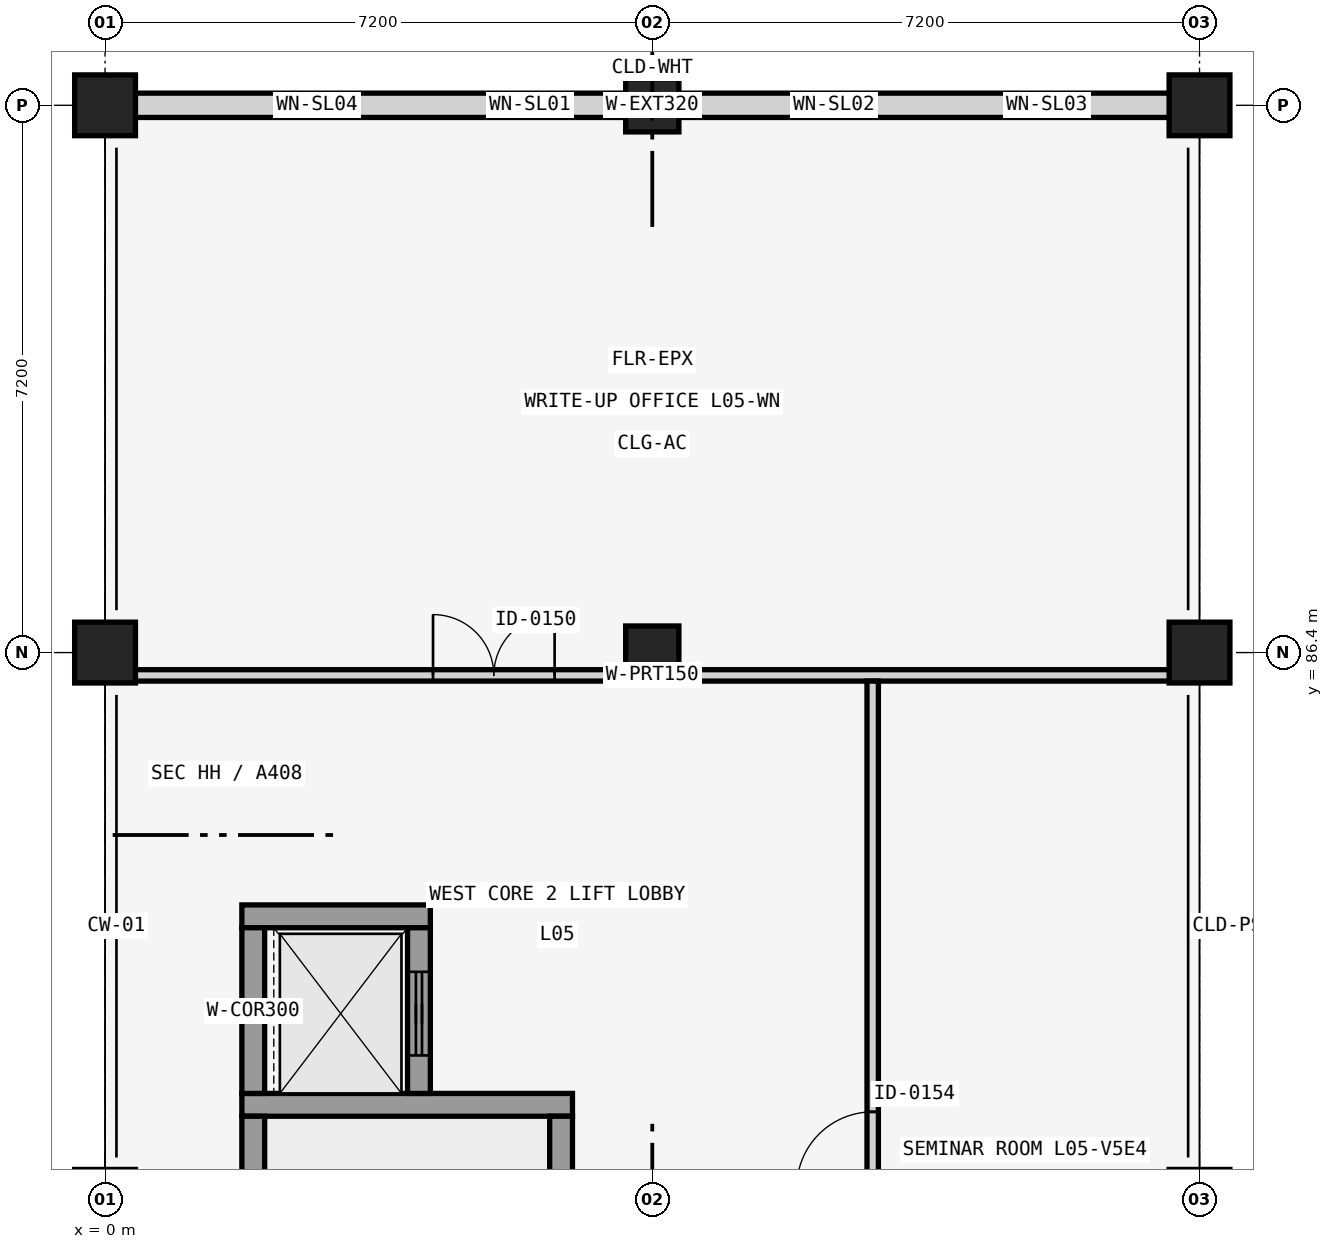
"""IFC4 building model, lengths in metres.
Left out: names, types, materials, properties, quantities, classifications, styles, units other than length and angle.
Written with IfcOpenShell. Run it as: python <this file> out.ifc"""

import sys

from ifc_helpers import new_model, si_unit, direction, frame, frame_2d, origin, origin_2d, place, context, subcontext, project, spatial, rectangle, extrude, element, fill, save


model = new_model("IFC4")
c1 = context("Model", 3, precision=1e-05, world=origin(), true_north=direction((0.0, 1.0)))
c2 = subcontext(c1, "Body", "Model", "MODEL_VIEW")
j1 = project(units=[si_unit("LENGTHUNIT", "METRE"), si_unit("PLANEANGLEUNIT", "RADIAN")], contexts=[c1])
p1 = place(None, origin())
s1 = spatial("IfcSite", under=j1, at=p1, CompositionType="ELEMENT")
p2 = place(p1, origin())
s2 = spatial("IfcBuilding", under=s1, at=p2, CompositionType="ELEMENT")
p3 = place(p2, frame((0.0, 0.0, 21.44)))
s3 = spatial("IfcBuildingStorey", under=s2, at=p3, CompositionType="ELEMENT", Elevation=21.44)
for number, where, z_axis, x_axis in (
    (1, (0.0, 86.4, 0.0), (0.0, 0.0, 1.0), (1.0, 0.0, 0.0)),
    (2, (0.0, 93.6, 0.0), (0.0, 0.0, 1.0), (1.0, 0.0, 0.0)),
):
    element("IfcColumn", number, at=place(p3, frame(where, z_axis=z_axis, x_axis=x_axis)), inside=s3, PredefinedType="COLUMN", context=c2, shape_type="SweptSolid", body=[
        extrude(rectangle(XDim=0.8, YDim=0.8, at=origin_2d()), origin(), (0.0, 0.0, 1.0), 4.16),
    ])
for number, where, z_axis, x_axis in (
    (3, (7.2, 86.4, 0.0), (0.0, 0.0, 1.0), (1.0, 0.0, 0.0)),
    (4, (7.2, 93.6, 0.0), (0.0, 0.0, 1.0), (1.0, 0.0, 0.0)),
):
    element("IfcColumn", number, at=place(p3, frame(where, z_axis=z_axis, x_axis=x_axis)), inside=s3, PredefinedType="COLUMN", context=c2, shape_type="SweptSolid", body=[
        extrude(rectangle(XDim=0.7, YDim=0.7, at=origin_2d()), origin(), (0.0, 0.0, 1.0), 4.16),
    ])
for number, where, z_axis, x_axis in (
    (5, (14.4, 86.4, 0.0), (0.0, 0.0, 1.0), (1.0, 0.0, 0.0)),
    (6, (14.4, 93.6, 0.0), (0.0, 0.0, 1.0), (1.0, 0.0, 0.0)),
):
    element("IfcColumn", number, at=place(p3, frame(where, z_axis=z_axis, x_axis=x_axis)), inside=s3, PredefinedType="COLUMN", context=c2, shape_type="SweptSolid", body=[
        extrude(rectangle(XDim=0.8, YDim=0.8, at=origin_2d()), origin(), (0.0, 0.0, 1.0), 4.16),
    ])
p4 = place(p3, frame((0.39, 93.6, 0.0), z_axis=(0.0, 0.0, 1.0), x_axis=(1.0, 0.0, 0.0)))
e7 = element("IfcWall", 7, at=p4, inside=s3, PredefinedType="SOLIDWALL", context=c2, shape_type="SweptSolid", body=[
    extrude(rectangle(XDim=13.62, YDim=0.32, at=frame_2d((6.81, 0.0))), origin(), (0.0, 0.0, 1.0), 3.42),
])
p5 = place(p4, frame((2.175, 0.0, 0.85)))
e8 = element("IfcOpeningElement", 8, at=p5, cuts=e7, PredefinedType="OPENING", context=c2, shape_type="SweptSolid", body=[
    extrude(rectangle(XDim=0.45, YDim=2.1, at=frame_2d((0.225, 1.05))), frame((0.0, 0.17, 0.0), z_axis=(0.0, -1.0, 0.0), x_axis=(1.0, 0.0, 0.0)), (0.0, 0.0, 1.0), 0.34),
])
p6 = place(p4, frame((4.975, 0.0, 0.85)))
e9 = element("IfcOpeningElement", 9, at=p6, cuts=e7, PredefinedType="OPENING", context=c2, shape_type="SweptSolid", body=[
    extrude(rectangle(XDim=0.45, YDim=2.4, at=frame_2d((0.225, 1.2))), frame((0.0, 0.17, 0.0), z_axis=(0.0, -1.0, 0.0), x_axis=(1.0, 0.0, 0.0)), (0.0, 0.0, 1.0), 0.34),
])
p7 = place(p4, frame((8.95, 0.0, 0.85)))
e10 = element("IfcOpeningElement", 10, at=p7, cuts=e7, PredefinedType="OPENING", context=c2, shape_type="SweptSolid", body=[
    extrude(rectangle(XDim=0.5, YDim=2.4, at=frame_2d((0.25, 1.2))), frame((0.0, 0.17, 0.0), z_axis=(0.0, -1.0, 0.0), x_axis=(1.0, 0.0, 0.0)), (0.0, 0.0, 1.0), 0.34),
])
p8 = place(p4, frame((11.725, 0.0, 0.85)))
e11 = element("IfcOpeningElement", 11, at=p8, cuts=e7, PredefinedType="OPENING", context=c2, shape_type="SweptSolid", body=[
    extrude(rectangle(XDim=0.55, YDim=2.2, at=frame_2d((0.275, 1.1))), frame((0.0, 0.17, 0.0), z_axis=(0.0, -1.0, 0.0), x_axis=(1.0, 0.0, 0.0)), (0.0, 0.0, 1.0), 0.34),
])
p9 = place(p3, frame((1.8, 80.45, 0.0), z_axis=(0.0, 0.0, 1.0), x_axis=(1.0, 0.0, 0.0)))
e12 = element("IfcWall", 12, at=p9, inside=s3, PredefinedType="SHEAR", context=c2, shape_type="SweptSolid", body=[
    extrude(rectangle(XDim=4.35, YDim=0.3, at=frame_2d((2.175, 0.0))), origin(), (0.0, 0.0, 1.0), 3.81),
])
p10 = place(p3, frame((1.95, 72.5, 0.0), z_axis=(0.0, 0.0, 1.0), x_axis=(0.0, 1.0, 0.0)))
e13 = element("IfcWall", 13, at=p10, inside=s3, PredefinedType="SHEAR", context=c2, shape_type="SweptSolid", body=[
    extrude(rectangle(XDim=7.8, YDim=0.3, at=frame_2d((3.9, 0.0))), origin(), (0.0, 0.0, 1.0), 3.81),
])
p11 = place(p3, frame((6.0, 72.5, 0.0), z_axis=(0.0, 0.0, 1.0), x_axis=(0.0, 1.0, 0.0)))
e14 = element("IfcWall", 14, at=p11, inside=s3, PredefinedType="SHEAR", context=c2, shape_type="SweptSolid", body=[
    extrude(rectangle(XDim=7.8, YDim=0.3, at=frame_2d((3.9, 0.0))), origin(), (0.0, 0.0, 1.0), 3.81),
])
p12 = place(p11, frame((0.4, 0.0, 0.0)))
e15 = element("IfcOpeningElement", 15, at=p12, cuts=e14, PredefinedType="OPENING", context=c2, shape_type="SweptSolid", body=[
    extrude(rectangle(XDim=1.15, YDim=2.2, at=frame_2d((0.575, 1.1))), frame((0.0, 0.16, 0.0), z_axis=(0.0, -1.0, 0.0), x_axis=(1.0, 0.0, 0.0)), (0.0, 0.0, 1.0), 0.32),
])
p13 = place(p3, frame((1.8, 82.93, 0.0), z_axis=(0.0, 0.0, 1.0), x_axis=(1.0, 0.0, 0.0)))
e16 = element("IfcWall", 16, at=p13, inside=s3, PredefinedType="SHEAR", context=c2, shape_type="SweptSolid", body=[
    extrude(rectangle(XDim=2.48, YDim=0.3, at=frame_2d((1.24, 0.0))), origin(), (0.0, 0.0, 1.0), 3.81),
])
p14 = place(p3, frame((1.95, 80.6, 0.0), z_axis=(0.0, 0.0, 1.0), x_axis=(0.0, 1.0, 0.0)))
e17 = element("IfcWall", 17, at=p14, inside=s3, PredefinedType="SHEAR", context=c2, shape_type="SweptSolid", body=[
    extrude(rectangle(XDim=2.18, YDim=0.3, at=frame_2d((1.09, 0.0))), origin(), (0.0, 0.0, 1.0), 3.81),
])
p15 = place(p3, frame((4.13, 80.6, 0.0), z_axis=(0.0, 0.0, 1.0), x_axis=(0.0, 1.0, 0.0)))
e18 = element("IfcWall", 18, at=p15, inside=s3, PredefinedType="SHEAR", context=c2, shape_type="SweptSolid", body=[
    extrude(rectangle(XDim=2.18, YDim=0.3, at=frame_2d((1.09, 0.0))), origin(), (0.0, 0.0, 1.0), 3.81),
])
p16 = place(p15, frame((0.5, 0.0, 0.0)))
e19 = element("IfcOpeningElement", 19, at=p16, cuts=e18, PredefinedType="OPENING", context=c2, shape_type="SweptSolid", body=[
    extrude(rectangle(XDim=1.1, YDim=2.2, at=frame_2d((0.55, 1.1))), frame((0.0, 0.16, 0.0), z_axis=(0.0, -1.0, 0.0), x_axis=(1.0, 0.0, 0.0)), (0.0, 0.0, 1.0), 0.32),
])
p17 = place(p3, frame((0.25, 86.1, 0.0), z_axis=(0.0, 0.0, 1.0), x_axis=(1.0, 0.0, 0.0)))
e20 = element("IfcWall", 20, at=p17, inside=s3, PredefinedType="PARTITIONING", context=c2, shape_type="SweptSolid", body=[
    extrude(rectangle(XDim=13.9, YDim=0.15, at=frame_2d((6.95, 0.0))), origin(), (0.0, 0.0, 1.0), 3.21),
])
p18 = place(p17, frame((4.065, 0.0, 0.0)))
e21 = element("IfcOpeningElement", 21, at=p18, cuts=e20, PredefinedType="OPENING", context=c2, shape_type="SweptSolid", body=[
    extrude(rectangle(XDim=1.6, YDim=2.25, at=frame_2d((0.8, 1.125))), frame((0.0, 0.085, 0.0), z_axis=(0.0, -1.0, 0.0), x_axis=(1.0, 0.0, 0.0)), (0.0, 0.0, 1.0), 0.17),
])
p19 = place(p3, frame((10.1, 73.69, 0.0), z_axis=(0.0, 0.0, 1.0), x_axis=(0.0, 1.0, 0.0)))
e22 = element("IfcWall", 22, at=p19, inside=s3, PredefinedType="PARTITIONING", context=c2, shape_type="SweptSolid", body=[
    extrude(rectangle(XDim=12.335, YDim=0.15, at=frame_2d((6.167, 0.0))), origin(), (0.0, 0.0, 1.0), 3.81),
])
p20 = place(p19, frame((5.667, 0.0, 0.0)))
e23 = element("IfcOpeningElement", 23, at=p20, cuts=e22, PredefinedType="OPENING", context=c2, shape_type="SweptSolid", body=[
    extrude(rectangle(XDim=1.0, YDim=2.1, at=frame_2d((0.5, 1.05))), frame((0.0, 0.085, 0.0), z_axis=(0.0, -1.0, 0.0), x_axis=(1.0, 0.0, 0.0)), (0.0, 0.0, 1.0), 0.17),
])
p21 = place(p5, origin())
e24 = element("IfcWindow", 24, at=p21, inside=s3, PartitioningType="SINGLE_PANEL", PredefinedType="WINDOW", context=c2, shape_type="SweptSolid", body=[
    extrude(rectangle(XDim=0.45, YDim=2.1, at=frame_2d((0.225, 1.05))), frame((0.0, 0.03, 0.0), z_axis=(0.0, -1.0, 0.0), x_axis=(1.0, 0.0, 0.0)), (0.0, 0.0, 1.0), 0.06),
])
fill(e8, e24)
p22 = place(p6, origin())
e25 = element("IfcWindow", 25, at=p22, inside=s3, PartitioningType="SINGLE_PANEL", PredefinedType="WINDOW", context=c2, shape_type="SweptSolid", body=[
    extrude(rectangle(XDim=0.45, YDim=2.4, at=frame_2d((0.225, 1.2))), frame((0.0, 0.03, 0.0), z_axis=(0.0, -1.0, 0.0), x_axis=(1.0, 0.0, 0.0)), (0.0, 0.0, 1.0), 0.06),
])
fill(e9, e25)
p23 = place(p7, origin())
e26 = element("IfcWindow", 26, at=p23, inside=s3, PartitioningType="SINGLE_PANEL", PredefinedType="WINDOW", context=c2, shape_type="SweptSolid", body=[
    extrude(rectangle(XDim=0.5, YDim=2.4, at=frame_2d((0.25, 1.2))), frame((0.0, 0.03, 0.0), z_axis=(0.0, -1.0, 0.0), x_axis=(1.0, 0.0, 0.0)), (0.0, 0.0, 1.0), 0.06),
])
fill(e10, e26)
p24 = place(p8, origin())
e27 = element("IfcWindow", 27, at=p24, inside=s3, PartitioningType="SINGLE_PANEL", PredefinedType="WINDOW", context=c2, shape_type="SweptSolid", body=[
    extrude(rectangle(XDim=0.55, YDim=2.2, at=frame_2d((0.275, 1.1))), frame((0.0, 0.03, 0.0), z_axis=(0.0, -1.0, 0.0), x_axis=(1.0, 0.0, 0.0)), (0.0, 0.0, 1.0), 0.06),
])
fill(e11, e27)
p25 = place(p16, origin())
e28 = element("IfcDoor", 28, at=p25, inside=s3, OperationType="SLIDING_TO_LEFT", PredefinedType="DOOR", context=c2, shape_type="SweptSolid", body=[
    extrude(rectangle(XDim=1.1, YDim=2.2, at=frame_2d((0.55, 1.1))), frame((0.0, 0.025, 0.0), z_axis=(0.0, -1.0, 0.0), x_axis=(1.0, 0.0, 0.0)), (0.0, 0.0, 1.0), 0.05),
])
fill(e19, e28)
p26 = place(p18, origin())
e29 = element("IfcDoor", 29, at=p26, inside=s3, OperationType="DOUBLE_DOOR_SINGLE_SWING", PredefinedType="DOOR", context=c2, shape_type="SweptSolid", body=[
    extrude(rectangle(XDim=1.6, YDim=2.25, at=frame_2d((0.8, 1.125))), frame((0.0, 0.025, 0.0), z_axis=(0.0, -1.0, 0.0), x_axis=(1.0, 0.0, 0.0)), (0.0, 0.0, 1.0), 0.05),
])
fill(e21, e29)
p27 = place(p20, origin())
e30 = element("IfcDoor", 30, at=p27, inside=s3, OperationType="SINGLE_SWING_LEFT", PredefinedType="DOOR", context=c2, shape_type="SweptSolid", body=[
    extrude(rectangle(XDim=1.0, YDim=2.1, at=frame_2d((0.5, 1.05))), frame((0.0, 0.025, 0.0), z_axis=(0.0, -1.0, 0.0), x_axis=(1.0, 0.0, 0.0)), (0.0, 0.0, 1.0), 0.05),
])
fill(e23, e30)
save(model, sys.argv[1])
